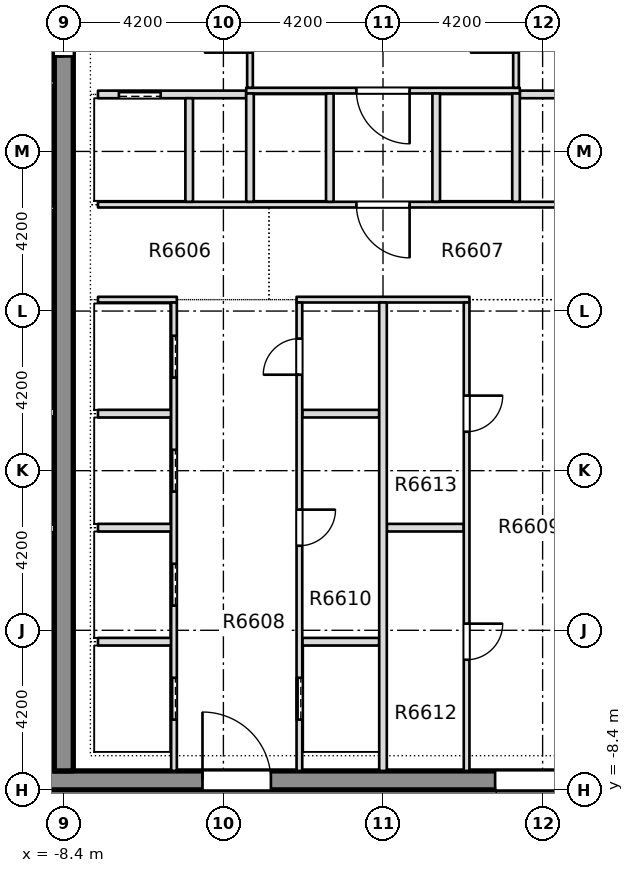
"""IFC4 building model, lengths in metres.
Left out: names, types, materials, properties, quantities, classifications, styles, units other than length and angle.
Written with IfcOpenShell. Run it as: python <this file> out.ifc"""

import sys

from ifc_helpers import new_model, si_unit, direction, frame, frame_2d, origin, place, context, subcontext, project, spatial, rectangle, extrude, element, fill, save


model = new_model("IFC4")
c1 = context("Model", 3, precision=1e-05, world=origin(), true_north=direction((0.0, 1.0)))
c2 = subcontext(c1, "Body", "Model", "MODEL_VIEW")
j1 = project(units=[si_unit("LENGTHUNIT", "METRE"), si_unit("PLANEANGLEUNIT", "RADIAN")], contexts=[c1])
p1 = place(None, origin())
s1 = spatial("IfcSite", under=j1, at=p1, CompositionType="ELEMENT")
p2 = place(p1, origin())
s2 = spatial("IfcBuilding", under=s1, at=p2, CompositionType="ELEMENT")
p3 = place(p2, frame((0.0, 0.0, 251.05)))
s3 = spatial("IfcBuildingStorey", under=s2, at=p3, CompositionType="ELEMENT", Elevation=251.05)
p4 = place(p3, frame((-12.1, -8.15, -0.4), z_axis=(0.0, 0.0, 1.0), x_axis=(1.0, 0.0, 0.0)))
e1 = element("IfcWall", 1, at=p4, inside=s3, PredefinedType="SHEAR", context=c2, shape_type="SweptSolid", body=[
    extrude(rectangle(XDim=24.2, YDim=0.5, at=frame_2d((12.1, 0.0))), origin(), (0.0, 0.0, 1.0), 3.45),
])
p5 = place(p4, frame((7.35, 0.0, 0.4)))
e2 = element("IfcOpeningElement", 2, at=p5, cuts=e1, PredefinedType="OPENING", context=c2, shape_type="SweptSolid", body=[
    extrude(rectangle(XDim=1.8, YDim=2.1, at=frame_2d((0.9, 1.05))), frame((0.0, 0.26, 0.0), z_axis=(0.0, -1.0, 0.0), x_axis=(1.0, 0.0, 0.0)), (0.0, 0.0, 1.0), 0.52),
])
p6 = place(p4, frame((15.05, 0.0, 0.4)))
e3 = element("IfcOpeningElement", 3, at=p6, cuts=e1, PredefinedType="OPENING", context=c2, shape_type="SweptSolid", body=[
    extrude(rectangle(XDim=1.8, YDim=2.1, at=frame_2d((0.9, 1.05))), frame((0.0, 0.26, 0.0), z_axis=(0.0, -1.0, 0.0), x_axis=(1.0, 0.0, 0.0)), (0.0, 0.0, 1.0), 0.52),
])
p7 = place(p3, frame((-8.4, -7.9, -0.4), z_axis=(0.0, 0.0, 1.0), x_axis=(0.0, 1.0, 0.0)))
e4 = element("IfcWall", 4, at=p7, inside=s3, PredefinedType="SHEAR", context=c2, shape_type="SweptSolid", body=[
    extrude(rectangle(XDim=29.15, YDim=0.5, at=frame_2d((14.575, 0.0))), origin(), (0.0, 0.0, 1.0), 3.45),
])
p8 = place(p7, frame((18.8, 0.0, 0.4)))
e5 = element("IfcOpeningElement", 5, at=p8, cuts=e4, PredefinedType="OPENING", context=c2, shape_type="SweptSolid", body=[
    extrude(rectangle(XDim=1.2, YDim=2.1, at=frame_2d((0.6, 1.05))), frame((0.0, 0.26, 0.0), z_axis=(0.0, -1.0, 0.0), x_axis=(1.0, 0.0, 0.0)), (0.0, 0.0, 1.0), 0.52),
])
p9 = place(p3, frame((-7.5, -4.5, 0.0), z_axis=(0.0, 0.0, 1.0), x_axis=(1.0, 0.0, 0.0)))
e6 = element("IfcWall", 6, at=p9, inside=s3, PredefinedType="PARTITIONING", context=c2, shape_type="SweptSolid", body=[
    extrude(rectangle(XDim=1.925, YDim=0.2, at=frame_2d((0.962, 0.0))), origin(), (0.0, 0.0, 1.0), 3.05),
])
p10 = place(p3, frame((-2.125, -4.5, 0.0), z_axis=(0.0, 0.0, 1.0), x_axis=(1.0, 0.0, 0.0)))
e7 = element("IfcWall", 7, at=p10, inside=s3, PredefinedType="PARTITIONING", context=c2, shape_type="SweptSolid", body=[
    extrude(rectangle(XDim=2.025, YDim=0.2, at=frame_2d((1.012, 0.0))), origin(), (0.0, 0.0, 1.0), 3.05),
])
p11 = place(p3, frame((-7.5, -1.5, 0.0), z_axis=(0.0, 0.0, 1.0), x_axis=(1.0, 0.0, 0.0)))
e8 = element("IfcWall", 8, at=p11, inside=s3, PredefinedType="PARTITIONING", context=c2, shape_type="SweptSolid", body=[
    extrude(rectangle(XDim=1.925, YDim=0.2, at=frame_2d((0.962, 0.0))), origin(), (0.0, 0.0, 1.0), 3.05),
])
p12 = place(p3, frame((0.1, -1.5, 0.0), z_axis=(0.0, 0.0, 1.0), x_axis=(1.0, 0.0, 0.0)))
e9 = element("IfcWall", 9, at=p12, inside=s3, PredefinedType="PARTITIONING", context=c2, shape_type="SweptSolid", body=[
    extrude(rectangle(XDim=2.025, YDim=0.2, at=frame_2d((1.012, 0.0))), origin(), (0.0, 0.0, 1.0), 3.05),
])
p13 = place(p3, frame((-7.5, 1.5, 0.0), z_axis=(0.0, 0.0, 1.0), x_axis=(1.0, 0.0, 0.0)))
e10 = element("IfcWall", 10, at=p13, inside=s3, PredefinedType="PARTITIONING", context=c2, shape_type="SweptSolid", body=[
    extrude(rectangle(XDim=1.925, YDim=0.2, at=frame_2d((0.962, 0.0))), origin(), (0.0, 0.0, 1.0), 3.05),
])
p14 = place(p3, frame((-2.125, 1.5, 0.0), z_axis=(0.0, 0.0, 1.0), x_axis=(1.0, 0.0, 0.0)))
e11 = element("IfcWall", 11, at=p14, inside=s3, PredefinedType="PARTITIONING", context=c2, shape_type="SweptSolid", body=[
    extrude(rectangle(XDim=2.025, YDim=0.2, at=frame_2d((1.012, 0.0))), origin(), (0.0, 0.0, 1.0), 3.05),
])
p15 = place(p3, frame((-7.5, 4.5, 0.0), z_axis=(0.0, 0.0, 1.0), x_axis=(1.0, 0.0, 0.0)))
e12 = element("IfcWall", 12, at=p15, inside=s3, PredefinedType="PARTITIONING", context=c2, shape_type="SweptSolid", body=[
    extrude(rectangle(XDim=2.075, YDim=0.15, at=frame_2d((1.038, 0.0))), origin(), (0.0, 0.0, 1.0), 3.05),
])
p16 = place(p3, frame((-2.275, 4.5, 0.0), z_axis=(0.0, 0.0, 1.0), x_axis=(1.0, 0.0, 0.0)))
e13 = element("IfcWall", 13, at=p16, inside=s3, PredefinedType="PARTITIONING", context=c2, shape_type="SweptSolid", body=[
    extrude(rectangle(XDim=4.55, YDim=0.15, at=frame_2d((2.275, 0.0))), origin(), (0.0, 0.0, 1.0), 3.05),
])
p17 = place(p3, frame((-7.5, 7.0, 0.0), z_axis=(0.0, 0.0, 1.0), x_axis=(1.0, 0.0, 0.0)))
e14 = element("IfcWall", 14, at=p17, inside=s3, PredefinedType="PARTITIONING", context=c2, shape_type="SweptSolid", body=[
    extrude(rectangle(XDim=15.0, YDim=0.15, at=frame_2d((7.5, 0.0))), origin(), (0.0, 0.0, 1.0), 3.05),
])
p18 = place(p17, frame((6.8, 0.0, 0.0)))
e15 = element("IfcOpeningElement", 15, at=p18, cuts=e14, PredefinedType="OPENING", context=c2, shape_type="SweptSolid", body=[
    extrude(rectangle(XDim=1.4, YDim=2.1, at=frame_2d((0.7, 1.05))), frame((0.0, 0.085, 0.0), z_axis=(0.0, -1.0, 0.0), x_axis=(1.0, 0.0, 0.0)), (0.0, 0.0, 1.0), 0.17),
])
p19 = place(p3, frame((-7.5, 9.9, 0.0), z_axis=(0.0, 0.0, 1.0), x_axis=(1.0, 0.0, 0.0)))
e16 = element("IfcWall", 16, at=p19, inside=s3, PredefinedType="PARTITIONING", context=c2, shape_type="SweptSolid", body=[
    extrude(rectangle(XDim=3.9, YDim=0.2, at=frame_2d((1.95, 0.0))), origin(), (0.0, 0.0, 1.0), 3.05),
])
p20 = place(p19, frame((0.55, 0.0, 0.0)))
e17 = element("IfcOpeningElement", 17, at=p20, cuts=e16, PredefinedType="OPENING", context=c2, shape_type="SweptSolid", body=[
    extrude(rectangle(XDim=1.1, YDim=2.1, at=frame_2d((0.55, 1.05))), frame((0.0, 0.11, 0.0), z_axis=(0.0, -1.0, 0.0), x_axis=(1.0, 0.0, 0.0)), (0.0, 0.0, 1.0), 0.22),
])
p21 = place(p3, frame((3.6, 9.9, 0.0), z_axis=(0.0, 0.0, 1.0), x_axis=(1.0, 0.0, 0.0)))
e18 = element("IfcWall", 18, at=p21, inside=s3, PredefinedType="PARTITIONING", context=c2, shape_type="SweptSolid", body=[
    extrude(rectangle(XDim=3.9, YDim=0.2, at=frame_2d((1.95, 0.0))), origin(), (0.0, 0.0, 1.0), 3.05),
])
p22 = place(p21, frame((2.25, 0.0, 0.0)))
e19 = element("IfcOpeningElement", 19, at=p22, cuts=e18, PredefinedType="OPENING", context=c2, shape_type="SweptSolid", body=[
    extrude(rectangle(XDim=1.1, YDim=2.1, at=frame_2d((0.55, 1.05))), frame((0.0, 0.11, 0.0), z_axis=(0.0, -1.0, 0.0), x_axis=(1.0, 0.0, 0.0)), (0.0, 0.0, 1.0), 0.22),
])
p23 = place(p3, frame((-3.6, 10.0, 0.0), z_axis=(0.0, 0.0, 1.0), x_axis=(1.0, 0.0, 0.0)))
e20 = element("IfcWall", 20, at=p23, inside=s3, PredefinedType="PARTITIONING", context=c2, shape_type="SweptSolid", body=[
    extrude(rectangle(XDim=7.2, YDim=0.15, at=frame_2d((3.6, 0.0))), origin(), (0.0, 0.0, 1.0), 3.05),
])
p24 = place(p23, frame((2.9, 0.0, 0.0)))
e21 = element("IfcOpeningElement", 21, at=p24, cuts=e20, PredefinedType="OPENING", context=c2, shape_type="SweptSolid", body=[
    extrude(rectangle(XDim=1.4, YDim=2.1, at=frame_2d((0.7, 1.05))), frame((0.0, 0.085, 0.0), z_axis=(0.0, -1.0, 0.0), x_axis=(1.0, 0.0, 0.0)), (0.0, 0.0, 1.0), 0.17),
])
p25 = place(p3, frame((-5.5, -7.899, 0.0), z_axis=(0.0, 0.0, 1.0), x_axis=(0.0, 1.0, 0.0)))
e22 = element("IfcWall", 22, at=p25, inside=s3, PredefinedType="PARTITIONING", context=c2, shape_type="SweptSolid", body=[
    extrude(rectangle(XDim=12.324, YDim=0.15, at=frame_2d((6.162, 0.0))), origin(), (0.0, 0.0, 1.0), 3.05),
])
p26 = place(p25, frame((1.349, 0.0, 0.0)))
e23 = element("IfcOpeningElement", 23, at=p26, cuts=e22, PredefinedType="OPENING", context=c2, shape_type="SweptSolid", body=[
    extrude(rectangle(XDim=1.1, YDim=2.1, at=frame_2d((0.55, 1.05))), frame((0.0, 0.085, 0.0), z_axis=(0.0, -1.0, 0.0), x_axis=(1.0, 0.0, 0.0)), (0.0, 0.0, 1.0), 0.17),
])
p27 = place(p25, frame((4.349, 0.0, 0.0)))
e24 = element("IfcOpeningElement", 24, at=p27, cuts=e22, PredefinedType="OPENING", context=c2, shape_type="SweptSolid", body=[
    extrude(rectangle(XDim=1.1, YDim=2.1, at=frame_2d((0.55, 1.05))), frame((0.0, 0.085, 0.0), z_axis=(0.0, -1.0, 0.0), x_axis=(1.0, 0.0, 0.0)), (0.0, 0.0, 1.0), 0.17),
])
p28 = place(p25, frame((7.349, 0.0, 0.0)))
e25 = element("IfcOpeningElement", 25, at=p28, cuts=e22, PredefinedType="OPENING", context=c2, shape_type="SweptSolid", body=[
    extrude(rectangle(XDim=1.1, YDim=2.1, at=frame_2d((0.55, 1.05))), frame((0.0, 0.085, 0.0), z_axis=(0.0, -1.0, 0.0), x_axis=(1.0, 0.0, 0.0)), (0.0, 0.0, 1.0), 0.17),
])
p29 = place(p25, frame((10.349, 0.0, 0.0)))
e26 = element("IfcOpeningElement", 26, at=p29, cuts=e22, PredefinedType="OPENING", context=c2, shape_type="SweptSolid", body=[
    extrude(rectangle(XDim=1.1, YDim=2.1, at=frame_2d((0.55, 1.05))), frame((0.0, 0.085, 0.0), z_axis=(0.0, -1.0, 0.0), x_axis=(1.0, 0.0, 0.0)), (0.0, 0.0, 1.0), 0.17),
])
p30 = place(p3, frame((-5.1, 7.075, 0.0), z_axis=(0.0, 0.0, 1.0), x_axis=(0.0, 1.0, 0.0)))
e27 = element("IfcWall", 27, at=p30, inside=s3, PredefinedType="PARTITIONING", context=c2, shape_type="SweptSolid", body=[
    extrude(rectangle(XDim=2.725, YDim=0.2, at=frame_2d((1.363, 0.0))), origin(), (0.0, 0.0, 1.0), 3.05),
])
p31 = place(p3, frame((-3.5, 7.075, 0.0), z_axis=(0.0, 0.0, 1.0), x_axis=(0.0, 1.0, 0.0)))
e28 = element("IfcWall", 28, at=p31, inside=s3, PredefinedType="PARTITIONING", context=c2, shape_type="SweptSolid", body=[
    extrude(rectangle(XDim=2.85, YDim=0.2, at=frame_2d((1.425, 0.0))), origin(), (0.0, 0.0, 1.0), 3.05),
])
p32 = place(p3, frame((-3.5, 10.075, 0.0), z_axis=(0.0, 0.0, 1.0), x_axis=(0.0, 1.0, 0.0)))
e29 = element("IfcWall", 29, at=p32, inside=s3, PredefinedType="PARTITIONING", context=c2, shape_type="SweptSolid", body=[
    extrude(rectangle(XDim=3.075, YDim=0.15, at=frame_2d((1.538, 0.0))), origin(), (0.0, 0.0, 1.0), 3.05),
])
p33 = place(p32, frame((0.925, 0.0, 0.0)))
e30 = element("IfcOpeningElement", 30, at=p33, cuts=e29, PredefinedType="OPENING", context=c2, shape_type="SweptSolid", body=[
    extrude(rectangle(XDim=1.2, YDim=2.1, at=frame_2d((0.6, 1.05))), frame((0.0, 0.085, 0.0), z_axis=(0.0, -1.0, 0.0), x_axis=(1.0, 0.0, 0.0)), (0.0, 0.0, 1.0), 0.17),
])
p34 = place(p3, frame((-2.2, -7.899, 0.0), z_axis=(0.0, 0.0, 1.0), x_axis=(0.0, 1.0, 0.0)))
e31 = element("IfcWall", 31, at=p34, inside=s3, PredefinedType="PARTITIONING", context=c2, shape_type="SweptSolid", body=[
    extrude(rectangle(XDim=12.324, YDim=0.15, at=frame_2d((6.162, 0.0))), origin(), (0.0, 0.0, 1.0), 3.05),
])
p35 = place(p34, frame((1.349, 0.0, 0.0)))
e32 = element("IfcOpeningElement", 32, at=p35, cuts=e31, PredefinedType="OPENING", context=c2, shape_type="SweptSolid", body=[
    extrude(rectangle(XDim=1.1, YDim=2.1, at=frame_2d((0.55, 1.05))), frame((0.0, 0.085, 0.0), z_axis=(0.0, -1.0, 0.0), x_axis=(1.0, 0.0, 0.0)), (0.0, 0.0, 1.0), 0.17),
])
p36 = place(p34, frame((5.924, 0.0, 0.0)))
e33 = element("IfcOpeningElement", 33, at=p36, cuts=e31, PredefinedType="OPENING", context=c2, shape_type="SweptSolid", body=[
    extrude(rectangle(XDim=0.95, YDim=2.1, at=frame_2d((0.475, 1.05))), frame((0.0, 0.085, 0.0), z_axis=(0.0, -1.0, 0.0), x_axis=(1.0, 0.0, 0.0)), (0.0, 0.0, 1.0), 0.17),
])
p37 = place(p34, frame((10.424, 0.0, 0.0)))
e34 = element("IfcOpeningElement", 34, at=p37, cuts=e31, PredefinedType="OPENING", context=c2, shape_type="SweptSolid", body=[
    extrude(rectangle(XDim=0.95, YDim=2.1, at=frame_2d((0.475, 1.05))), frame((0.0, 0.085, 0.0), z_axis=(0.0, -1.0, 0.0), x_axis=(1.0, 0.0, 0.0)), (0.0, 0.0, 1.0), 0.17),
])
p38 = place(p3, frame((-1.4, 7.075, 0.0), z_axis=(0.0, 0.0, 1.0), x_axis=(0.0, 1.0, 0.0)))
e35 = element("IfcWall", 35, at=p38, inside=s3, PredefinedType="PARTITIONING", context=c2, shape_type="SweptSolid", body=[
    extrude(rectangle(XDim=2.85, YDim=0.2, at=frame_2d((1.425, 0.0))), origin(), (0.0, 0.0, 1.0), 3.05),
])
p39 = place(p3, frame((0.0, -7.899, 0.0), z_axis=(0.0, 0.0, 1.0), x_axis=(0.0, 1.0, 0.0)))
e36 = element("IfcWall", 36, at=p39, inside=s3, PredefinedType="PARTITIONING", context=c2, shape_type="SweptSolid", body=[
    extrude(rectangle(XDim=12.324, YDim=0.2, at=frame_2d((6.162, 0.0))), origin(), (0.0, 0.0, 1.0), 3.05),
])
p40 = place(p3, frame((1.4, 7.075, 0.0), z_axis=(0.0, 0.0, 1.0), x_axis=(0.0, 1.0, 0.0)))
e37 = element("IfcWall", 37, at=p40, inside=s3, PredefinedType="PARTITIONING", context=c2, shape_type="SweptSolid", body=[
    extrude(rectangle(XDim=2.85, YDim=0.2, at=frame_2d((1.425, 0.0))), origin(), (0.0, 0.0, 1.0), 3.05),
])
p41 = place(p3, frame((2.2, -7.899, 0.0), z_axis=(0.0, 0.0, 1.0), x_axis=(0.0, 1.0, 0.0)))
e38 = element("IfcWall", 38, at=p41, inside=s3, PredefinedType="PARTITIONING", context=c2, shape_type="SweptSolid", body=[
    extrude(rectangle(XDim=12.324, YDim=0.15, at=frame_2d((6.162, 0.0))), origin(), (0.0, 0.0, 1.0), 3.05),
])
p42 = place(p41, frame((2.924, 0.0, 0.0)))
e39 = element("IfcOpeningElement", 39, at=p42, cuts=e38, PredefinedType="OPENING", context=c2, shape_type="SweptSolid", body=[
    extrude(rectangle(XDim=0.95, YDim=2.1, at=frame_2d((0.475, 1.05))), frame((0.0, 0.085, 0.0), z_axis=(0.0, -1.0, 0.0), x_axis=(1.0, 0.0, 0.0)), (0.0, 0.0, 1.0), 0.17),
])
p43 = place(p41, frame((8.924, 0.0, 0.0)))
e40 = element("IfcOpeningElement", 40, at=p43, cuts=e38, PredefinedType="OPENING", context=c2, shape_type="SweptSolid", body=[
    extrude(rectangle(XDim=0.95, YDim=2.1, at=frame_2d((0.475, 1.05))), frame((0.0, 0.085, 0.0), z_axis=(0.0, -1.0, 0.0), x_axis=(1.0, 0.0, 0.0)), (0.0, 0.0, 1.0), 0.17),
])
p44 = place(p3, frame((3.5, 7.075, 0.0), z_axis=(0.0, 0.0, 1.0), x_axis=(0.0, 1.0, 0.0)))
e41 = element("IfcWall", 41, at=p44, inside=s3, PredefinedType="PARTITIONING", context=c2, shape_type="SweptSolid", body=[
    extrude(rectangle(XDim=2.85, YDim=0.2, at=frame_2d((1.425, 0.0))), origin(), (0.0, 0.0, 1.0), 3.05),
])
p45 = place(p3, frame((3.5, 10.075, 0.0), z_axis=(0.0, 0.0, 1.0), x_axis=(0.0, 1.0, 0.0)))
e42 = element("IfcWall", 42, at=p45, inside=s3, PredefinedType="PARTITIONING", context=c2, shape_type="SweptSolid", body=[
    extrude(rectangle(XDim=3.075, YDim=0.15, at=frame_2d((1.538, 0.0))), origin(), (0.0, 0.0, 1.0), 3.05),
])
p46 = place(p45, frame((0.925, 0.0, 0.0)))
e43 = element("IfcOpeningElement", 43, at=p46, cuts=e42, PredefinedType="OPENING", context=c2, shape_type="SweptSolid", body=[
    extrude(rectangle(XDim=1.2, YDim=2.1, at=frame_2d((0.6, 1.05))), frame((0.0, 0.085, 0.0), z_axis=(0.0, -1.0, 0.0), x_axis=(1.0, 0.0, 0.0)), (0.0, 0.0, 1.0), 0.17),
])
for number, where, z_axis, x_axis in (
    (44, (-12.099, -1.519, 0.0), (0.0, 0.0, 1.0), (1.0, 0.0, 0.0)),
    (45, (-12.099, 1.533, 0.0), (0.0, 0.0, 1.0), (1.0, 0.0, 0.0)),
):
    element("IfcWall", number, at=place(p3, frame(where, z_axis=z_axis, x_axis=x_axis)), inside=s3, PredefinedType="PARTITIONING", context=c2, shape_type="SweptSolid", body=[
        extrude(rectangle(XDim=3.448, YDim=0.2, at=frame_2d((1.724, 0.0))), origin(), (0.0, 0.0, 1.0), 3.05),
    ])
for number, where, z_axis, x_axis in (
    (46, (-12.099, 6.904, 0.0), (0.0, 0.0, 1.0), (1.0, 0.0, 0.0)),
    (47, (-12.099, 10.2, 0.0), (0.0, 0.0, 1.0), (1.0, 0.0, 0.0)),
):
    element("IfcWall", number, at=place(p3, frame(where, z_axis=z_axis, x_axis=x_axis)), inside=s3, PredefinedType="PARTITIONING", context=c2, shape_type="SweptSolid", body=[
        extrude(rectangle(XDim=3.448, YDim=0.1, at=frame_2d((1.724, 0.0))), origin(), (0.0, 0.0, 1.0), 3.05),
    ])
p47 = place(p26, origin())
e48 = element("IfcDoor", 48, at=p47, inside=s3, OperationType="SLIDING_TO_LEFT", PredefinedType="DOOR", context=c2, shape_type="SweptSolid", body=[
    extrude(rectangle(XDim=1.1, YDim=2.1, at=frame_2d((0.55, 1.05))), frame((0.0, 0.025, 0.0), z_axis=(0.0, -1.0, 0.0), x_axis=(1.0, 0.0, 0.0)), (0.0, 0.0, 1.0), 0.05),
])
fill(e23, e48)
p48 = place(p27, origin())
e49 = element("IfcDoor", 49, at=p48, inside=s3, OperationType="SLIDING_TO_LEFT", PredefinedType="DOOR", context=c2, shape_type="SweptSolid", body=[
    extrude(rectangle(XDim=1.1, YDim=2.1, at=frame_2d((0.55, 1.05))), frame((0.0, 0.025, 0.0), z_axis=(0.0, -1.0, 0.0), x_axis=(1.0, 0.0, 0.0)), (0.0, 0.0, 1.0), 0.05),
])
fill(e24, e49)
p49 = place(p28, origin())
e50 = element("IfcDoor", 50, at=p49, inside=s3, OperationType="SLIDING_TO_LEFT", PredefinedType="DOOR", context=c2, shape_type="SweptSolid", body=[
    extrude(rectangle(XDim=1.1, YDim=2.1, at=frame_2d((0.55, 1.05))), frame((0.0, 0.025, 0.0), z_axis=(0.0, -1.0, 0.0), x_axis=(1.0, 0.0, 0.0)), (0.0, 0.0, 1.0), 0.05),
])
fill(e25, e50)
p50 = place(p29, origin())
e51 = element("IfcDoor", 51, at=p50, inside=s3, OperationType="SLIDING_TO_LEFT", PredefinedType="DOOR", context=c2, shape_type="SweptSolid", body=[
    extrude(rectangle(XDim=1.1, YDim=2.1, at=frame_2d((0.55, 1.05))), frame((0.0, 0.025, 0.0), z_axis=(0.0, -1.0, 0.0), x_axis=(1.0, 0.0, 0.0)), (0.0, 0.0, 1.0), 0.05),
])
fill(e26, e51)
p51 = place(p35, origin())
e52 = element("IfcDoor", 52, at=p51, inside=s3, OperationType="SLIDING_TO_LEFT", PredefinedType="DOOR", context=c2, shape_type="SweptSolid", body=[
    extrude(rectangle(XDim=1.1, YDim=2.1, at=frame_2d((0.55, 1.05))), frame((0.0, 0.025, 0.0), z_axis=(0.0, -1.0, 0.0), x_axis=(1.0, 0.0, 0.0)), (0.0, 0.0, 1.0), 0.05),
])
fill(e32, e52)
p52 = place(p36, origin())
e53 = element("IfcDoor", 53, at=p52, inside=s3, OperationType="SINGLE_SWING_LEFT", PredefinedType="DOOR", context=c2, shape_type="SweptSolid", body=[
    extrude(rectangle(XDim=0.95, YDim=2.1, at=frame_2d((0.475, 1.05))), frame((0.0, 0.025, 0.0), z_axis=(0.0, -1.0, 0.0), x_axis=(1.0, 0.0, 0.0)), (0.0, 0.0, 1.0), 0.05),
])
fill(e33, e53)
p53 = place(p37, origin())
e54 = element("IfcDoor", 54, at=p53, inside=s3, OperationType="SINGLE_SWING_RIGHT", PredefinedType="DOOR", context=c2, shape_type="SweptSolid", body=[
    extrude(rectangle(XDim=0.95, YDim=2.1, at=frame_2d((0.475, 1.05))), frame((0.0, 0.025, 0.0), z_axis=(0.0, -1.0, 0.0), x_axis=(1.0, 0.0, 0.0)), (0.0, 0.0, 1.0), 0.05),
])
fill(e34, e54)
p54 = place(p42, origin())
e55 = element("IfcDoor", 55, at=p54, inside=s3, OperationType="SINGLE_SWING_RIGHT", PredefinedType="DOOR", context=c2, shape_type="SweptSolid", body=[
    extrude(rectangle(XDim=0.95, YDim=2.1, at=frame_2d((0.475, 1.05))), frame((0.0, 0.025, 0.0), z_axis=(0.0, -1.0, 0.0), x_axis=(1.0, 0.0, 0.0)), (0.0, 0.0, 1.0), 0.05),
])
fill(e39, e55)
p55 = place(p43, origin())
e56 = element("IfcDoor", 56, at=p55, inside=s3, OperationType="SINGLE_SWING_RIGHT", PredefinedType="DOOR", context=c2, shape_type="SweptSolid", body=[
    extrude(rectangle(XDim=0.95, YDim=2.1, at=frame_2d((0.475, 1.05))), frame((0.0, 0.025, 0.0), z_axis=(0.0, -1.0, 0.0), x_axis=(1.0, 0.0, 0.0)), (0.0, 0.0, 1.0), 0.05),
])
fill(e40, e56)
p56 = place(p20, origin())
e57 = element("IfcDoor", 57, at=p56, inside=s3, OperationType="SLIDING_TO_RIGHT", PredefinedType="DOOR", context=c2, shape_type="SweptSolid", body=[
    extrude(rectangle(XDim=1.1, YDim=2.1, at=frame_2d((0.55, 1.05))), frame((0.0, 0.025, 0.0), z_axis=(0.0, -1.0, 0.0), x_axis=(1.0, 0.0, 0.0)), (0.0, 0.0, 1.0), 0.05),
])
fill(e17, e57)
p57 = place(p18, origin())
e58 = element("IfcDoor", 58, at=p57, inside=s3, OperationType="SINGLE_SWING_RIGHT", PredefinedType="DOOR", context=c2, shape_type="SweptSolid", body=[
    extrude(rectangle(XDim=1.4, YDim=2.1, at=frame_2d((0.7, 1.05))), frame((0.0, 0.025, 0.0), z_axis=(0.0, -1.0, 0.0), x_axis=(1.0, 0.0, 0.0)), (0.0, 0.0, 1.0), 0.05),
])
fill(e15, e58)
p58 = place(p24, origin())
e59 = element("IfcDoor", 59, at=p58, inside=s3, OperationType="SINGLE_SWING_RIGHT", PredefinedType="DOOR", context=c2, shape_type="SweptSolid", body=[
    extrude(rectangle(XDim=1.4, YDim=2.1, at=frame_2d((0.7, 1.05))), frame((0.0, 0.025, 0.0), z_axis=(0.0, -1.0, 0.0), x_axis=(1.0, 0.0, 0.0)), (0.0, 0.0, 1.0), 0.05),
])
fill(e21, e59)
p59 = place(p5, origin())
e60 = element("IfcDoor", 60, at=p59, inside=s3, OperationType="SINGLE_SWING_LEFT", PredefinedType="DOOR", context=c2, shape_type="SweptSolid", body=[
    extrude(rectangle(XDim=1.8, YDim=2.1, at=frame_2d((0.9, 1.05))), frame((0.0, 0.025, 0.0), z_axis=(0.0, -1.0, 0.0), x_axis=(1.0, 0.0, 0.0)), (0.0, 0.0, 1.0), 0.05),
])
fill(e2, e60)
p60 = place(p6, origin())
e61 = element("IfcDoor", 61, at=p60, inside=s3, OperationType="SINGLE_SWING_LEFT", PredefinedType="DOOR", context=c2, shape_type="SweptSolid", body=[
    extrude(rectangle(XDim=1.8, YDim=2.1, at=frame_2d((0.9, 1.05))), frame((0.0, 0.025, 0.0), z_axis=(0.0, -1.0, 0.0), x_axis=(1.0, 0.0, 0.0)), (0.0, 0.0, 1.0), 0.05),
])
fill(e3, e61)
p61 = place(p8, origin())
e62 = element("IfcDoor", 62, at=p61, inside=s3, OperationType="SINGLE_SWING_LEFT", PredefinedType="DOOR", context=c2, shape_type="SweptSolid", body=[
    extrude(rectangle(XDim=1.2, YDim=2.1, at=frame_2d((0.6, 1.05))), frame((0.0, 0.025, 0.0), z_axis=(0.0, -1.0, 0.0), x_axis=(1.0, 0.0, 0.0)), (0.0, 0.0, 1.0), 0.05),
])
fill(e5, e62)
save(model, sys.argv[1])
